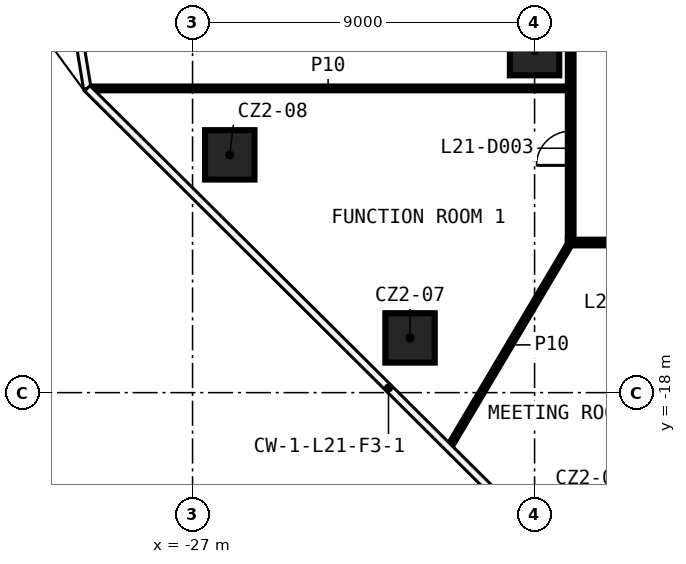
"""IFC4 building model, lengths in metres.
Left out: names, types, materials, properties, quantities, classifications, styles, units other than length and angle.
Written with IfcOpenShell. Run it as: python <this file> out.ifc"""

import sys

from ifc_helpers import new_model, si_unit, direction, frame, frame_2d, origin, origin_2d, place, context, subcontext, project, spatial, rectangle, extrude, element, fill, save


model = new_model("IFC4")
c1 = context("Model", 3, precision=1e-05, world=origin(), true_north=direction((0.0, 1.0)))
c2 = subcontext(c1, "Body", "Model", "MODEL_VIEW")
j1 = project(units=[si_unit("LENGTHUNIT", "METRE"), si_unit("PLANEANGLEUNIT", "RADIAN")], contexts=[c1])
p1 = place(None, origin())
s1 = spatial("IfcSite", under=j1, at=p1, CompositionType="ELEMENT")
p2 = place(p1, origin())
s2 = spatial("IfcBuilding", under=s1, at=p2, CompositionType="ELEMENT")
p3 = place(p2, frame((0.0, 0.0, 102.6)))
s3 = spatial("IfcBuildingStorey", under=s2, at=p3, CompositionType="ELEMENT", Elevation=102.6)
for number, where, z_axis, x_axis in (
    (1, (-21.277, -16.56, 0.0), (0.0, 0.0, 1.0), (1.0, 0.0, 0.0)),
    (2, (-26.021, -11.743, 0.0), (0.0, 0.0, 1.0), (1.0, 0.0, 0.0)),
    (3, (-18.0, -9.0, 0.0), (0.0, 0.0, 1.0), (1.0, 0.0, 0.0)),
):
    element("IfcColumn", number, at=place(p3, frame(where, z_axis=z_axis, x_axis=x_axis)), inside=s3, PredefinedType="COLUMN", context=c2, shape_type="SweptSolid", body=[
        extrude(rectangle(XDim=1.3, YDim=1.3, at=origin_2d()), origin(), (0.0, 0.0, 1.0), 3.3),
    ])
p4 = place(p3, frame((17.125, -14.05, 0.0), z_axis=(0.0, 0.0, 1.0), x_axis=(-1.0, 0.0, 0.0)))
e4 = element("IfcWall", 4, at=p4, inside=s3, PredefinedType="PARTITIONING", context=c2, shape_type="SweptSolid", body=[
    extrude(rectangle(XDim=34.25, YDim=0.15, at=frame_2d((17.125, 0.0))), origin(), (0.0, 0.0, 1.0), 3.3),
])
p5 = place(p4, frame((32.158, 0.0, 0.0)))
e5 = element("IfcOpeningElement", 5, at=p5, cuts=e4, PredefinedType="OPENING", context=c2, shape_type="SweptSolid", body=[
    extrude(rectangle(XDim=0.9, YDim=2.1, at=frame_2d((0.45, 1.05))), frame((0.0, 0.085, 0.0), z_axis=(0.0, -1.0, 0.0), x_axis=(1.0, 0.0, 0.0)), (0.0, 0.0, 1.0), 0.17),
])
p6 = place(p4, frame((27.561, 0.0, 0.0)))
e6 = element("IfcOpeningElement", 6, at=p6, cuts=e4, PredefinedType="OPENING", context=c2, shape_type="SweptSolid", body=[
    extrude(rectangle(XDim=1.0, YDim=2.1, at=frame_2d((0.5, 1.05))), frame((0.0, 0.085, 0.0), z_axis=(0.0, -1.0, 0.0), x_axis=(1.0, 0.0, 0.0)), (0.0, 0.0, 1.0), 0.17),
])
p7 = place(p4, frame((18.64, 0.0, 0.0)))
e7 = element("IfcOpeningElement", 7, at=p7, cuts=e4, PredefinedType="OPENING", context=c2, shape_type="SweptSolid", body=[
    extrude(rectangle(XDim=1.0, YDim=2.1, at=frame_2d((0.5, 1.05))), frame((0.0, 0.085, 0.0), z_axis=(0.0, -1.0, 0.0), x_axis=(1.0, 0.0, 0.0)), (0.0, 0.0, 1.0), 0.17),
])
p8 = place(p4, frame((16.624, 0.0, 0.0)))
e8 = element("IfcOpeningElement", 8, at=p8, cuts=e4, PredefinedType="OPENING", context=c2, shape_type="SweptSolid", body=[
    extrude(rectangle(XDim=1.0, YDim=2.1, at=frame_2d((0.5, 1.05))), frame((0.0, 0.085, 0.0), z_axis=(0.0, -1.0, 0.0), x_axis=(1.0, 0.0, 0.0)), (0.0, 0.0, 1.0), 0.17),
])
p9 = place(p4, frame((9.807, 0.0, 0.0)))
e9 = element("IfcOpeningElement", 9, at=p9, cuts=e4, PredefinedType="OPENING", context=c2, shape_type="SweptSolid", body=[
    extrude(rectangle(XDim=1.0, YDim=2.1, at=frame_2d((0.5, 1.05))), frame((0.0, 0.085, 0.0), z_axis=(0.0, -1.0, 0.0), x_axis=(1.0, 0.0, 0.0)), (0.0, 0.0, 1.0), 0.17),
])
p10 = place(p4, frame((7.795, 0.0, 0.0)))
e10 = element("IfcOpeningElement", 10, at=p10, cuts=e4, PredefinedType="OPENING", context=c2, shape_type="SweptSolid", body=[
    extrude(rectangle(XDim=1.0, YDim=2.1, at=frame_2d((0.5, 1.05))), frame((0.0, 0.085, 0.0), z_axis=(0.0, -1.0, 0.0), x_axis=(1.0, 0.0, 0.0)), (0.0, 0.0, 1.0), 0.17),
])
p11 = place(p4, frame((1.119, 0.0, 0.0)))
e11 = element("IfcOpeningElement", 11, at=p11, cuts=e4, PredefinedType="OPENING", context=c2, shape_type="SweptSolid", body=[
    extrude(rectangle(XDim=1.0, YDim=2.1, at=frame_2d((0.5, 1.05))), frame((0.0, 0.085, 0.0), z_axis=(0.0, -1.0, 0.0), x_axis=(1.0, 0.0, 0.0)), (0.0, 0.0, 1.0), 0.17),
])
p12 = place(p3, frame((-29.742, -9.994, 0.0), z_axis=(0.0, 0.0, 1.0), x_axis=(1.0, 0.0, 0.0)))
e12 = element("IfcWall", 12, at=p12, inside=s3, PredefinedType="PARTITIONING", context=c2, shape_type="SweptSolid", body=[
    extrude(rectangle(XDim=12.617, YDim=0.1, at=frame_2d((6.308, 0.0))), origin(), (0.0, 0.0, 1.0), 3.3),
])
p13 = place(p3, frame((-20.246, -19.436, 0.0), z_axis=(0.0, 0.0, 1.0), x_axis=(0.510253226363, 0.86002421186, 0.0)))
e13 = element("IfcWall", 13, at=p13, inside=s3, PredefinedType="PARTITIONING", context=c2, shape_type="SweptSolid", body=[
    extrude(rectangle(XDim=6.263, YDim=0.1, at=frame_2d((3.132, 0.0))), origin(), (0.0, 0.0, 1.0), 3.3),
])
p14 = place(p3, frame((-17.05, -13.975, 0.0), z_axis=(0.0, 0.0, 1.0), x_axis=(0.0, 1.0, 0.0)))
e14 = element("IfcWall", 14, at=p14, inside=s3, PredefinedType="PARTITIONING", context=c2, shape_type="SweptSolid", body=[
    extrude(rectangle(XDim=27.95, YDim=0.15, at=frame_2d((13.975, 0.0))), origin(), (0.0, 0.0, 1.0), 3.3),
])
p15 = place(p14, frame((11.195, 0.0, 0.0)))
e15 = element("IfcOpeningElement", 15, at=p15, cuts=e14, PredefinedType="OPENING", context=c2, shape_type="SweptSolid", body=[
    extrude(rectangle(XDim=0.9, YDim=2.1, at=frame_2d((0.45, 1.05))), frame((0.0, 0.085, 0.0), z_axis=(0.0, -1.0, 0.0), x_axis=(1.0, 0.0, 0.0)), (0.0, 0.0, 1.0), 0.17),
])
p16 = place(p14, frame((8.57, 0.0, 0.0)))
e16 = element("IfcOpeningElement", 16, at=p16, cuts=e14, PredefinedType="OPENING", context=c2, shape_type="SweptSolid", body=[
    extrude(rectangle(XDim=0.9, YDim=2.1, at=frame_2d((0.45, 1.05))), frame((0.0, 0.085, 0.0), z_axis=(0.0, -1.0, 0.0), x_axis=(1.0, 0.0, 0.0)), (0.0, 0.0, 1.0), 0.17),
])
p17 = place(p14, frame((1.956, 0.0, 0.0)))
e17 = element("IfcOpeningElement", 17, at=p17, cuts=e14, PredefinedType="OPENING", context=c2, shape_type="SweptSolid", body=[
    extrude(rectangle(XDim=0.9, YDim=2.1, at=frame_2d((0.45, 1.05))), frame((0.0, 0.085, 0.0), z_axis=(0.0, -1.0, 0.0), x_axis=(1.0, 0.0, 0.0)), (0.0, 0.0, 1.0), 0.17),
])
p18 = place(p14, frame((25.181, 0.0, 0.0)))
e18 = element("IfcOpeningElement", 18, at=p18, cuts=e14, PredefinedType="OPENING", context=c2, shape_type="SweptSolid", body=[
    extrude(rectangle(XDim=0.9, YDim=2.1, at=frame_2d((0.45, 1.05))), frame((0.0, 0.085, 0.0), z_axis=(0.0, -1.0, 0.0), x_axis=(1.0, 0.0, 0.0)), (0.0, 0.0, 1.0), 0.17),
])
p19 = place(p14, frame((20.101, 0.0, 0.0)))
e19 = element("IfcOpeningElement", 19, at=p19, cuts=e14, PredefinedType="OPENING", context=c2, shape_type="SweptSolid", body=[
    extrude(rectangle(XDim=0.9, YDim=2.1, at=frame_2d((0.45, 1.05))), frame((0.0, 0.085, 0.0), z_axis=(0.0, -1.0, 0.0), x_axis=(1.0, 0.0, 0.0)), (0.0, 0.0, 1.0), 0.17),
])
p20 = place(p14, frame((16.206, 0.0, 0.0)))
e20 = element("IfcOpeningElement", 20, at=p20, cuts=e14, PredefinedType="OPENING", context=c2, shape_type="SweptSolid", body=[
    extrude(rectangle(XDim=0.9, YDim=2.1, at=frame_2d((0.45, 1.05))), frame((0.0, 0.085, 0.0), z_axis=(0.0, -1.0, 0.0), x_axis=(1.0, 0.0, 0.0)), (0.0, 0.0, 1.0), 0.17),
])
p21 = place(p17, origin())
e21 = element("IfcDoor", 21, at=p21, inside=s3, OperationType="SINGLE_SWING_LEFT", PredefinedType="DOOR", context=c2, shape_type="SweptSolid", body=[
    extrude(rectangle(XDim=0.9, YDim=2.1, at=frame_2d((0.45, 1.05))), frame((0.0, 0.025, 0.0), z_axis=(0.0, -1.0, 0.0), x_axis=(1.0, 0.0, 0.0)), (0.0, 0.0, 1.0), 0.05),
])
fill(e17, e21)
save(model, sys.argv[1])
